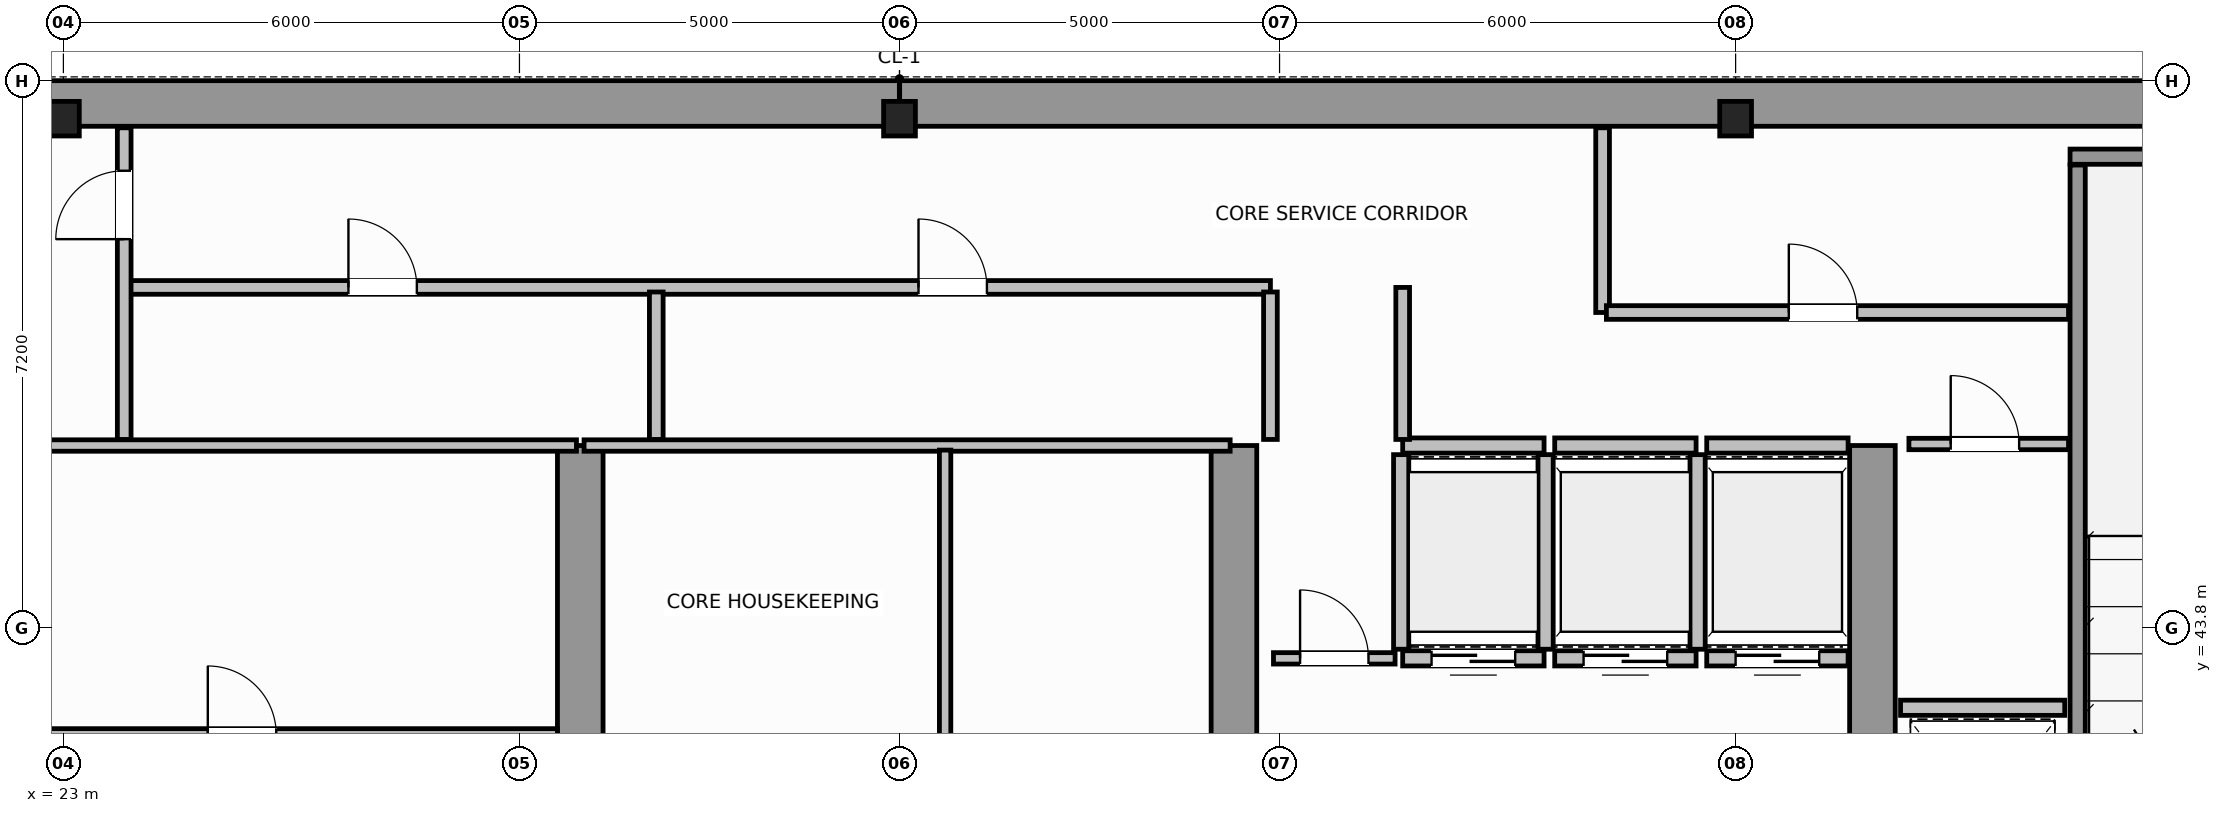
"""IFC4 building model, lengths in metres.
Left out: names, types, materials, properties, quantities, classifications, styles, units other than length and angle.
Written with IfcOpenShell. Run it as: python <this file> out.ifc"""

import sys

from ifc_helpers import new_model, si_unit, direction, frame, frame_2d, origin, origin_2d, place, context, subcontext, project, spatial, rectangle, i_section, extrude, source, transform, mapped, element, fill, save


model = new_model("IFC4")
c1 = context("Model", 3, precision=1e-05, world=origin(), true_north=direction((0.0, 1.0)))
c2 = subcontext(c1, "Body", "Model", "MODEL_VIEW")
j1 = project(units=[si_unit("LENGTHUNIT", "METRE"), si_unit("PLANEANGLEUNIT", "RADIAN")], contexts=[c1])
p1 = place(None, origin())
s1 = spatial("IfcSite", under=j1, at=p1, CompositionType="ELEMENT")
p2 = place(p1, origin())
s2 = spatial("IfcBuilding", under=s1, at=p2, CompositionType="ELEMENT")
p3 = place(p2, frame((0.0, 0.0, 230.8)))
s3 = spatial("IfcBuildingStorey", under=s2, at=p3, CompositionType="ELEMENT", Elevation=230.8)
m1 = source(origin(), c2, "Body", "SweptSolid", [
    extrude(i_section(OverallWidth=0.418, OverallDepth=0.455, WebThickness=0.042, FlangeThickness=0.058, FilletRadius=0.015, at=origin_2d()), origin(), (0.0, 0.0, 1.0), 3.8),
])
for number, where, z_axis, x_axis in (
    (1, (23.0, 50.5, 0.0), (0.0, 0.0, 1.0), (1.0, 0.0, 0.0)),
    (2, (34.0, 50.5, 0.0), (0.0, 0.0, 1.0), (1.0, 0.0, 0.0)),
    (3, (45.0, 50.5, 0.0), (0.0, 0.0, 1.0), (1.0, 0.0, 0.0)),
):
    element("IfcColumn", number, at=place(p3, frame(where, z_axis=z_axis, x_axis=x_axis)), inside=s3, PredefinedType="COLUMN", context=c2, shape_type="MappedRepresentation", body=[
        mapped(m1, transform((0.0, 0.0, 0.0), scale=1.0)),
    ])
for number, where, z_axis, x_axis in (
    (4, (14.304, 50.7, 0.0), (0.0, 0.0, 1.0), (1.0, 0.0, 0.0)),
    (5, (34.002, 50.7, 0.0), (0.0, 0.0, 1.0), (1.0, 0.0, 0.0)),
):
    element("IfcWall", number, at=place(p3, frame(where, z_axis=z_axis, x_axis=x_axis)), inside=s3, PredefinedType="SHEAR", context=c2, shape_type="SweptSolid", body=[
        extrude(rectangle(XDim=19.694, YDim=0.6, at=frame_2d((9.847, 0.0))), origin(), (0.0, 0.0, 1.0), 3.8),
    ])
for number, where, z_axis, x_axis in (
    (6, (29.8, 36.82, 0.0), (0.0, 0.0, 1.0), (0.0, 1.0, 0.0)),
    (7, (38.4, 36.82, 0.0), (0.0, 0.0, 1.0), (0.0, 1.0, 0.0)),
    (8, (46.8, 36.82, 0.0), (0.0, 0.0, 1.0), (0.0, 1.0, 0.0)),
):
    element("IfcWall", number, at=place(p3, frame(where, z_axis=z_axis, x_axis=x_axis)), inside=s3, PredefinedType="SHEAR", context=c2, shape_type="SweptSolid", body=[
        extrude(rectangle(XDim=9.38, YDim=0.6, at=frame_2d((4.69, 0.0))), origin(), (0.0, 0.0, 1.0), 3.8),
    ])
p4 = place(p3, frame((49.4, 50.0, 0.0), z_axis=(0.0, 0.0, 1.0), x_axis=(1.0, 0.0, 0.0)))
e9 = element("IfcWall", 9, at=p4, inside=s3, PredefinedType="SOLIDWALL", context=c2, shape_type="SweptSolid", body=[
    extrude(rectangle(XDim=4.3, YDim=0.2, at=frame_2d((2.15, 0.0))), origin(), (0.0, 0.0, 1.0), 3.8),
])
p5 = place(p3, frame((49.5, 39.96, 0.0), z_axis=(0.0, 0.0, 1.0), x_axis=(0.0, 1.0, 0.0)))
e10 = element("IfcWall", 10, at=p5, inside=s3, PredefinedType="SOLIDWALL", context=c2, shape_type="SweptSolid", body=[
    extrude(rectangle(XDim=9.93, YDim=0.2, at=frame_2d((4.965, 0.0))), origin(), (0.0, 0.0, 1.0), 3.8),
])
p6 = place(p3, frame((40.62, 43.4, 0.0), z_axis=(0.0, 0.0, 1.0), x_axis=(1.0, 0.0, 0.0)))
e11 = element("IfcWall", 11, at=p6, inside=s3, PredefinedType="SOLIDWALL", context=c2, shape_type="SweptSolid", body=[
    extrude(rectangle(XDim=1.86, YDim=0.2, at=frame_2d((0.93, 0.0))), origin(), (0.0, 0.0, 1.0), 3.58),
])
p7 = place(p6, frame((0.38, 0.0, 0.0)))
e12 = element("IfcOpeningElement", 12, at=p7, cuts=e11, PredefinedType="OPENING", context=c2, shape_type="SweptSolid", body=[
    extrude(rectangle(XDim=1.1, YDim=2.15, at=frame_2d((0.55, 1.075))), frame((0.0, 0.11, 0.0), z_axis=(0.0, -1.0, 0.0), x_axis=(1.0, 0.0, 0.0)), (0.0, 0.0, 1.0), 0.22),
])
p8 = place(p3, frame((40.62, 46.2, 0.0), z_axis=(0.0, 0.0, 1.0), x_axis=(1.0, 0.0, 0.0)))
e13 = element("IfcWall", 13, at=p8, inside=s3, PredefinedType="SOLIDWALL", context=c2, shape_type="SweptSolid", body=[
    extrude(rectangle(XDim=1.86, YDim=0.2, at=frame_2d((0.93, 0.0))), origin(), (0.0, 0.0, 1.0), 3.58),
])
for number, where, z_axis, x_axis in (
    (14, (40.6, 43.52, 0.0), (0.0, 0.0, 1.0), (0.0, 1.0, 0.0)),
    (15, (42.5, 43.52, 0.0), (0.0, 0.0, 1.0), (0.0, 1.0, 0.0)),
):
    element("IfcWall", number, at=place(p3, frame(where, z_axis=z_axis, x_axis=x_axis)), inside=s3, PredefinedType="SOLIDWALL", context=c2, shape_type="SweptSolid", body=[
        extrude(rectangle(XDim=2.56, YDim=0.2, at=frame_2d((1.28, 0.0))), origin(), (0.0, 0.0, 1.0), 3.58),
    ])
p9 = place(p3, frame((42.62, 43.4, 0.0), z_axis=(0.0, 0.0, 1.0), x_axis=(1.0, 0.0, 0.0)))
e16 = element("IfcWall", 16, at=p9, inside=s3, PredefinedType="SOLIDWALL", context=c2, shape_type="SweptSolid", body=[
    extrude(rectangle(XDim=1.86, YDim=0.2, at=frame_2d((0.93, 0.0))), origin(), (0.0, 0.0, 1.0), 3.58),
])
p10 = place(p9, frame((0.38, 0.0, 0.0)))
e17 = element("IfcOpeningElement", 17, at=p10, cuts=e16, PredefinedType="OPENING", context=c2, shape_type="SweptSolid", body=[
    extrude(rectangle(XDim=1.1, YDim=2.15, at=frame_2d((0.55, 1.075))), frame((0.0, 0.11, 0.0), z_axis=(0.0, -1.0, 0.0), x_axis=(1.0, 0.0, 0.0)), (0.0, 0.0, 1.0), 0.22),
])
p11 = place(p3, frame((42.62, 46.2, 0.0), z_axis=(0.0, 0.0, 1.0), x_axis=(1.0, 0.0, 0.0)))
e18 = element("IfcWall", 18, at=p11, inside=s3, PredefinedType="SOLIDWALL", context=c2, shape_type="SweptSolid", body=[
    extrude(rectangle(XDim=1.86, YDim=0.2, at=frame_2d((0.93, 0.0))), origin(), (0.0, 0.0, 1.0), 3.58),
])
p12 = place(p3, frame((44.5, 43.52, 0.0), z_axis=(0.0, 0.0, 1.0), x_axis=(0.0, 1.0, 0.0)))
e19 = element("IfcWall", 19, at=p12, inside=s3, PredefinedType="SOLIDWALL", context=c2, shape_type="SweptSolid", body=[
    extrude(rectangle(XDim=2.56, YDim=0.2, at=frame_2d((1.28, 0.0))), origin(), (0.0, 0.0, 1.0), 3.58),
])
p13 = place(p3, frame((44.62, 43.4, 0.0), z_axis=(0.0, 0.0, 1.0), x_axis=(1.0, 0.0, 0.0)))
e20 = element("IfcWall", 20, at=p13, inside=s3, PredefinedType="SOLIDWALL", context=c2, shape_type="SweptSolid", body=[
    extrude(rectangle(XDim=1.86, YDim=0.2, at=frame_2d((0.93, 0.0))), origin(), (0.0, 0.0, 1.0), 3.58),
])
p14 = place(p13, frame((0.38, 0.0, 0.0)))
e21 = element("IfcOpeningElement", 21, at=p14, cuts=e20, PredefinedType="OPENING", context=c2, shape_type="SweptSolid", body=[
    extrude(rectangle(XDim=1.1, YDim=2.15, at=frame_2d((0.55, 1.075))), frame((0.0, 0.11, 0.0), z_axis=(0.0, -1.0, 0.0), x_axis=(1.0, 0.0, 0.0)), (0.0, 0.0, 1.0), 0.22),
])
p15 = place(p3, frame((44.62, 46.2, 0.0), z_axis=(0.0, 0.0, 1.0), x_axis=(1.0, 0.0, 0.0)))
e22 = element("IfcWall", 22, at=p15, inside=s3, PredefinedType="SOLIDWALL", context=c2, shape_type="SweptSolid", body=[
    extrude(rectangle(XDim=1.86, YDim=0.2, at=frame_2d((0.93, 0.0))), origin(), (0.0, 0.0, 1.0), 3.58),
])
p16 = place(p3, frame((47.17, 42.75, 0.0), z_axis=(0.0, 0.0, 1.0), x_axis=(1.0, 0.0, 0.0)))
e23 = element("IfcWall", 23, at=p16, inside=s3, PredefinedType="SOLIDWALL", context=c2, shape_type="SweptSolid", body=[
    extrude(rectangle(XDim=2.16, YDim=0.2, at=frame_2d((1.08, 0.0))), origin(), (0.0, 0.0, 1.0), 3.58),
])
p17 = place(p3, frame((21.25, 46.2, 0.0), z_axis=(0.0, 0.0, 1.0), x_axis=(1.0, 0.0, 0.0)))
e24 = element("IfcWall", 24, at=p17, inside=s3, PredefinedType="PARTITIONING", context=c2, shape_type="SweptSolid", body=[
    extrude(rectangle(XDim=8.5, YDim=0.15, at=frame_2d((4.25, 0.0))), origin(), (0.0, 0.0, 1.0), 3.58),
])
p18 = place(p3, frame((21.5, 42.4, 0.0), z_axis=(0.0, 0.0, 1.0), x_axis=(1.0, 0.0, 0.0)))
e25 = element("IfcWall", 25, at=p18, inside=s3, PredefinedType="PARTITIONING", context=c2, shape_type="SweptSolid", body=[
    extrude(rectangle(XDim=8.0, YDim=0.15, at=frame_2d((4.0, 0.0))), origin(), (0.0, 0.0, 1.0), 3.58),
])
p19 = place(p18, frame((3.4, 0.0, 0.0)))
e26 = element("IfcOpeningElement", 26, at=p19, cuts=e25, PredefinedType="OPENING", context=c2, shape_type="SweptSolid", body=[
    extrude(rectangle(XDim=0.9, YDim=2.1, at=frame_2d((0.45, 1.05))), frame((0.0, 0.085, 0.0), z_axis=(0.0, -1.0, 0.0), x_axis=(1.0, 0.0, 0.0)), (0.0, 0.0, 1.0), 0.17),
])
p20 = place(p3, frame((29.85, 46.2, 0.0), z_axis=(0.0, 0.0, 1.0), x_axis=(1.0, 0.0, 0.0)))
e27 = element("IfcWall", 27, at=p20, inside=s3, PredefinedType="PARTITIONING", context=c2, shape_type="SweptSolid", body=[
    extrude(rectangle(XDim=8.5, YDim=0.15, at=frame_2d((4.25, 0.0))), origin(), (0.0, 0.0, 1.0), 3.58),
])
p21 = place(p3, frame((34.6, 36.56, 0.0), z_axis=(0.0, 0.0, 1.0), x_axis=(0.0, 1.0, 0.0)))
e28 = element("IfcWall", 28, at=p21, inside=s3, PredefinedType="PARTITIONING", context=c2, shape_type="SweptSolid", body=[
    extrude(rectangle(XDim=9.58, YDim=0.15, at=frame_2d((4.79, 0.0))), origin(), (0.0, 0.0, 1.0), 3.58),
])
p22 = place(p21, frame((4.2, 0.0, 0.0)))
e29 = element("IfcOpeningElement", 29, at=p22, cuts=e28, PredefinedType="OPENING", context=c2, shape_type="SweptSolid", body=[
    extrude(rectangle(XDim=0.9, YDim=2.1, at=frame_2d((0.45, 1.05))), frame((0.0, 0.085, 0.0), z_axis=(0.0, -1.0, 0.0), x_axis=(1.0, 0.0, 0.0)), (0.0, 0.0, 1.0), 0.17),
])
p23 = place(p3, frame((47.28, 46.22, 0.0), z_axis=(0.0, 0.0, 1.0), x_axis=(1.0, 0.0, 0.0)))
e30 = element("IfcWall", 30, at=p23, inside=s3, PredefinedType="PARTITIONING", context=c2, shape_type="SweptSolid", body=[
    extrude(rectangle(XDim=2.1, YDim=0.15, at=frame_2d((1.05, 0.0))), origin(), (0.0, 0.0, 1.0), 3.58),
])
p24 = place(p23, frame((0.55, 0.0, 0.0)))
e31 = element("IfcOpeningElement", 31, at=p24, cuts=e30, PredefinedType="OPENING", context=c2, shape_type="SweptSolid", body=[
    extrude(rectangle(XDim=0.9, YDim=2.1, at=frame_2d((0.45, 1.05))), frame((0.0, 0.085, 0.0), z_axis=(0.0, -1.0, 0.0), x_axis=(1.0, 0.0, 0.0)), (0.0, 0.0, 1.0), 0.17),
])
p25 = place(p3, frame((38.92, 43.4, 0.0), z_axis=(0.0, 0.0, 1.0), x_axis=(1.0, 0.0, 0.0)))
e32 = element("IfcWall", 32, at=p25, inside=s3, PredefinedType="PARTITIONING", context=c2, shape_type="SweptSolid", body=[
    extrude(rectangle(XDim=1.6, YDim=0.15, at=frame_2d((0.8, 0.0))), origin(), (0.0, 0.0, 1.0), 3.58),
])
p26 = place(p25, frame((0.35, 0.0, 0.0)))
e33 = element("IfcOpeningElement", 33, at=p26, cuts=e32, PredefinedType="OPENING", context=c2, shape_type="SweptSolid", body=[
    extrude(rectangle(XDim=0.9, YDim=2.1, at=frame_2d((0.45, 1.05))), frame((0.0, 0.085, 0.0), z_axis=(0.0, -1.0, 0.0), x_axis=(1.0, 0.0, 0.0)), (0.0, 0.0, 1.0), 0.17),
])
p27 = place(p3, frame((23.85, 48.28, 0.0), z_axis=(0.0, 0.0, 1.0), x_axis=(1.0, 0.0, 0.0)))
e34 = element("IfcWall", 34, at=p27, inside=s3, PredefinedType="PLUMBINGWALL", context=c2, shape_type="SweptSolid", body=[
    extrude(rectangle(XDim=15.03, YDim=0.18, at=frame_2d((7.515, 0.0))), origin(), (0.0, 0.0, 1.0), 3.58),
])
p28 = place(p27, frame((2.9, 0.0, 0.0)))
e35 = element("IfcOpeningElement", 35, at=p28, cuts=e34, PredefinedType="OPENING", context=c2, shape_type="SweptSolid", body=[
    extrude(rectangle(XDim=0.9, YDim=2.15, at=frame_2d((0.45, 1.075))), frame((0.0, 0.1, 0.0), z_axis=(0.0, -1.0, 0.0), x_axis=(1.0, 0.0, 0.0)), (0.0, 0.0, 1.0), 0.2),
])
p29 = place(p27, frame((10.4, 0.0, 0.0)))
e36 = element("IfcOpeningElement", 36, at=p29, cuts=e34, PredefinedType="OPENING", context=c2, shape_type="SweptSolid", body=[
    extrude(rectangle(XDim=0.9, YDim=2.15, at=frame_2d((0.45, 1.075))), frame((0.0, 0.1, 0.0), z_axis=(0.0, -1.0, 0.0), x_axis=(1.0, 0.0, 0.0)), (0.0, 0.0, 1.0), 0.2),
])
p30 = place(p3, frame((23.8, 46.28, 0.0), z_axis=(0.0, 0.0, 1.0), x_axis=(0.0, 1.0, 0.0)))
e37 = element("IfcWall", 37, at=p30, inside=s3, PredefinedType="PLUMBINGWALL", context=c2, shape_type="SweptSolid", body=[
    extrude(rectangle(XDim=4.1, YDim=0.18, at=frame_2d((2.05, 0.0))), origin(), (0.0, 0.0, 1.0), 3.58),
])
p31 = place(p30, frame((2.635, 0.0, 0.0)))
e38 = element("IfcOpeningElement", 38, at=p31, cuts=e37, PredefinedType="OPENING", context=c2, shape_type="SweptSolid", body=[
    extrude(rectangle(XDim=0.9, YDim=2.15, at=frame_2d((0.45, 1.075))), frame((0.0, 0.1, 0.0), z_axis=(0.0, -1.0, 0.0), x_axis=(1.0, 0.0, 0.0)), (0.0, 0.0, 1.0), 0.2),
])
for number, where, z_axis, x_axis in (
    (39, (30.8, 46.28, 0.0), (0.0, 0.0, 1.0), (0.0, 1.0, 0.0)),
    (40, (38.88, 46.28, 0.0), (0.0, 0.0, 1.0), (0.0, 1.0, 0.0)),
):
    element("IfcWall", number, at=place(p3, frame(where, z_axis=z_axis, x_axis=x_axis)), inside=s3, PredefinedType="PLUMBINGWALL", context=c2, shape_type="SweptSolid", body=[
        extrude(rectangle(XDim=1.94, YDim=0.18, at=frame_2d((0.97, 0.0))), origin(), (0.0, 0.0, 1.0), 3.58),
    ])
p32 = place(p3, frame((40.62, 46.28, 0.0), z_axis=(0.0, 0.0, 1.0), x_axis=(0.0, 1.0, 0.0)))
e41 = element("IfcWall", 41, at=p32, inside=s3, PredefinedType="PLUMBINGWALL", context=c2, shape_type="SweptSolid", body=[
    extrude(rectangle(XDim=2.0, YDim=0.18, at=frame_2d((1.0, 0.0))), origin(), (0.0, 0.0, 1.0), 3.58),
])
p33 = place(p3, frame((43.25, 47.95, 0.0), z_axis=(0.0, 0.0, 1.0), x_axis=(0.0, 1.0, 0.0)))
e42 = element("IfcWall", 42, at=p33, inside=s3, PredefinedType="PLUMBINGWALL", context=c2, shape_type="SweptSolid", body=[
    extrude(rectangle(XDim=2.43, YDim=0.18, at=frame_2d((1.215, 0.0))), origin(), (0.0, 0.0, 1.0), 3.58),
])
p34 = place(p3, frame((43.3, 47.95, 0.0), z_axis=(0.0, 0.0, 1.0), x_axis=(1.0, 0.0, 0.0)))
e43 = element("IfcWall", 43, at=p34, inside=s3, PredefinedType="PLUMBINGWALL", context=c2, shape_type="SweptSolid", body=[
    extrude(rectangle(XDim=6.08, YDim=0.18, at=frame_2d((3.04, 0.0))), origin(), (0.0, 0.0, 1.0), 3.58),
])
p35 = place(p34, frame((2.4, 0.0, 0.0)))
e44 = element("IfcOpeningElement", 44, at=p35, cuts=e43, PredefinedType="OPENING", context=c2, shape_type="SweptSolid", body=[
    extrude(rectangle(XDim=0.9, YDim=2.15, at=frame_2d((0.45, 1.075))), frame((0.0, 0.1, 0.0), z_axis=(0.0, -1.0, 0.0), x_axis=(1.0, 0.0, 0.0)), (0.0, 0.0, 1.0), 0.2),
])
m2 = source(origin(), c2, "Body", "SweptSolid", [
    extrude(rectangle(XDim=1.1, YDim=2.15, at=frame_2d((0.55, 1.075))), frame((0.0, 0.025, 0.0), z_axis=(0.0, -1.0, 0.0), x_axis=(1.0, 0.0, 0.0)), (0.0, 0.0, 1.0), 0.05),
])
p36 = place(p7, origin())
e45 = element("IfcDoor", 45, at=p36, inside=s3, OperationType="DOUBLE_DOOR_SLIDING", PredefinedType="DOOR", context=c2, shape_type="MappedRepresentation", body=[
    mapped(m2, transform((0.0, 0.0, 0.0), scale=1.0)),
])
fill(e12, e45)
p37 = place(p10, origin())
e46 = element("IfcDoor", 46, at=p37, inside=s3, OperationType="DOUBLE_DOOR_SLIDING", PredefinedType="DOOR", context=c2, shape_type="MappedRepresentation", body=[
    mapped(m2, transform((0.0, 0.0, 0.0), scale=1.0)),
])
fill(e17, e46)
p38 = place(p14, origin())
e47 = element("IfcDoor", 47, at=p38, inside=s3, OperationType="DOUBLE_DOOR_SLIDING", PredefinedType="DOOR", context=c2, shape_type="MappedRepresentation", body=[
    mapped(m2, transform((0.0, 0.0, 0.0), scale=1.0)),
])
fill(e21, e47)
m3 = source(origin(), c2, "Body", "SweptSolid", [
    extrude(rectangle(XDim=0.9, YDim=2.1, at=frame_2d((0.45, 1.05))), frame((0.0, 0.025, 0.0), z_axis=(0.0, -1.0, 0.0), x_axis=(1.0, 0.0, 0.0)), (0.0, 0.0, 1.0), 0.05),
])
p39 = place(p19, origin())
e48 = element("IfcDoor", 48, at=p39, inside=s3, OperationType="SINGLE_SWING_RIGHT", PredefinedType="DOOR", context=c2, shape_type="MappedRepresentation", body=[
    mapped(m3, transform((0.0, 0.0, 0.0), scale=1.0)),
])
fill(e26, e48)
p40 = place(p24, origin())
e49 = element("IfcDoor", 49, at=p40, inside=s3, OperationType="SINGLE_SWING_RIGHT", PredefinedType="DOOR", context=c2, shape_type="MappedRepresentation", body=[
    mapped(m3, transform((0.0, 0.0, 0.0), scale=1.0)),
])
fill(e31, e49)
p41 = place(p26, origin())
e50 = element("IfcDoor", 50, at=p41, inside=s3, OperationType="SINGLE_SWING_LEFT", PredefinedType="DOOR", context=c2, shape_type="MappedRepresentation", body=[
    mapped(m3, transform((0.0, 0.0, 0.0), scale=1.0)),
])
fill(e33, e50)
m4 = source(origin(), c2, "Body", "SweptSolid", [
    extrude(rectangle(XDim=0.9, YDim=2.15, at=frame_2d((0.45, 1.075))), frame((0.0, 0.025, 0.0), z_axis=(0.0, -1.0, 0.0), x_axis=(1.0, 0.0, 0.0)), (0.0, 0.0, 1.0), 0.05),
])
p42 = place(p31, origin())
e51 = element("IfcDoor", 51, at=p42, inside=s3, OperationType="SINGLE_SWING_LEFT", PredefinedType="DOOR", context=c2, shape_type="MappedRepresentation", body=[
    mapped(m4, transform((0.0, 0.0, 0.0), scale=1.0)),
])
fill(e38, e51)
p43 = place(p28, origin())
e52 = element("IfcDoor", 52, at=p43, inside=s3, OperationType="SINGLE_SWING_RIGHT", PredefinedType="DOOR", context=c2, shape_type="MappedRepresentation", body=[
    mapped(m4, transform((0.0, 0.0, 0.0), scale=1.0)),
])
fill(e35, e52)
p44 = place(p29, origin())
e53 = element("IfcDoor", 53, at=p44, inside=s3, OperationType="SINGLE_SWING_LEFT", PredefinedType="DOOR", context=c2, shape_type="MappedRepresentation", body=[
    mapped(m4, transform((0.0, 0.0, 0.0), scale=1.0)),
])
fill(e36, e53)
p45 = place(p35, origin())
e54 = element("IfcDoor", 54, at=p45, inside=s3, OperationType="SINGLE_SWING_RIGHT", PredefinedType="DOOR", context=c2, shape_type="MappedRepresentation", body=[
    mapped(m4, transform((0.0, 0.0, 0.0), scale=1.0)),
])
fill(e44, e54)
save(model, sys.argv[1])
